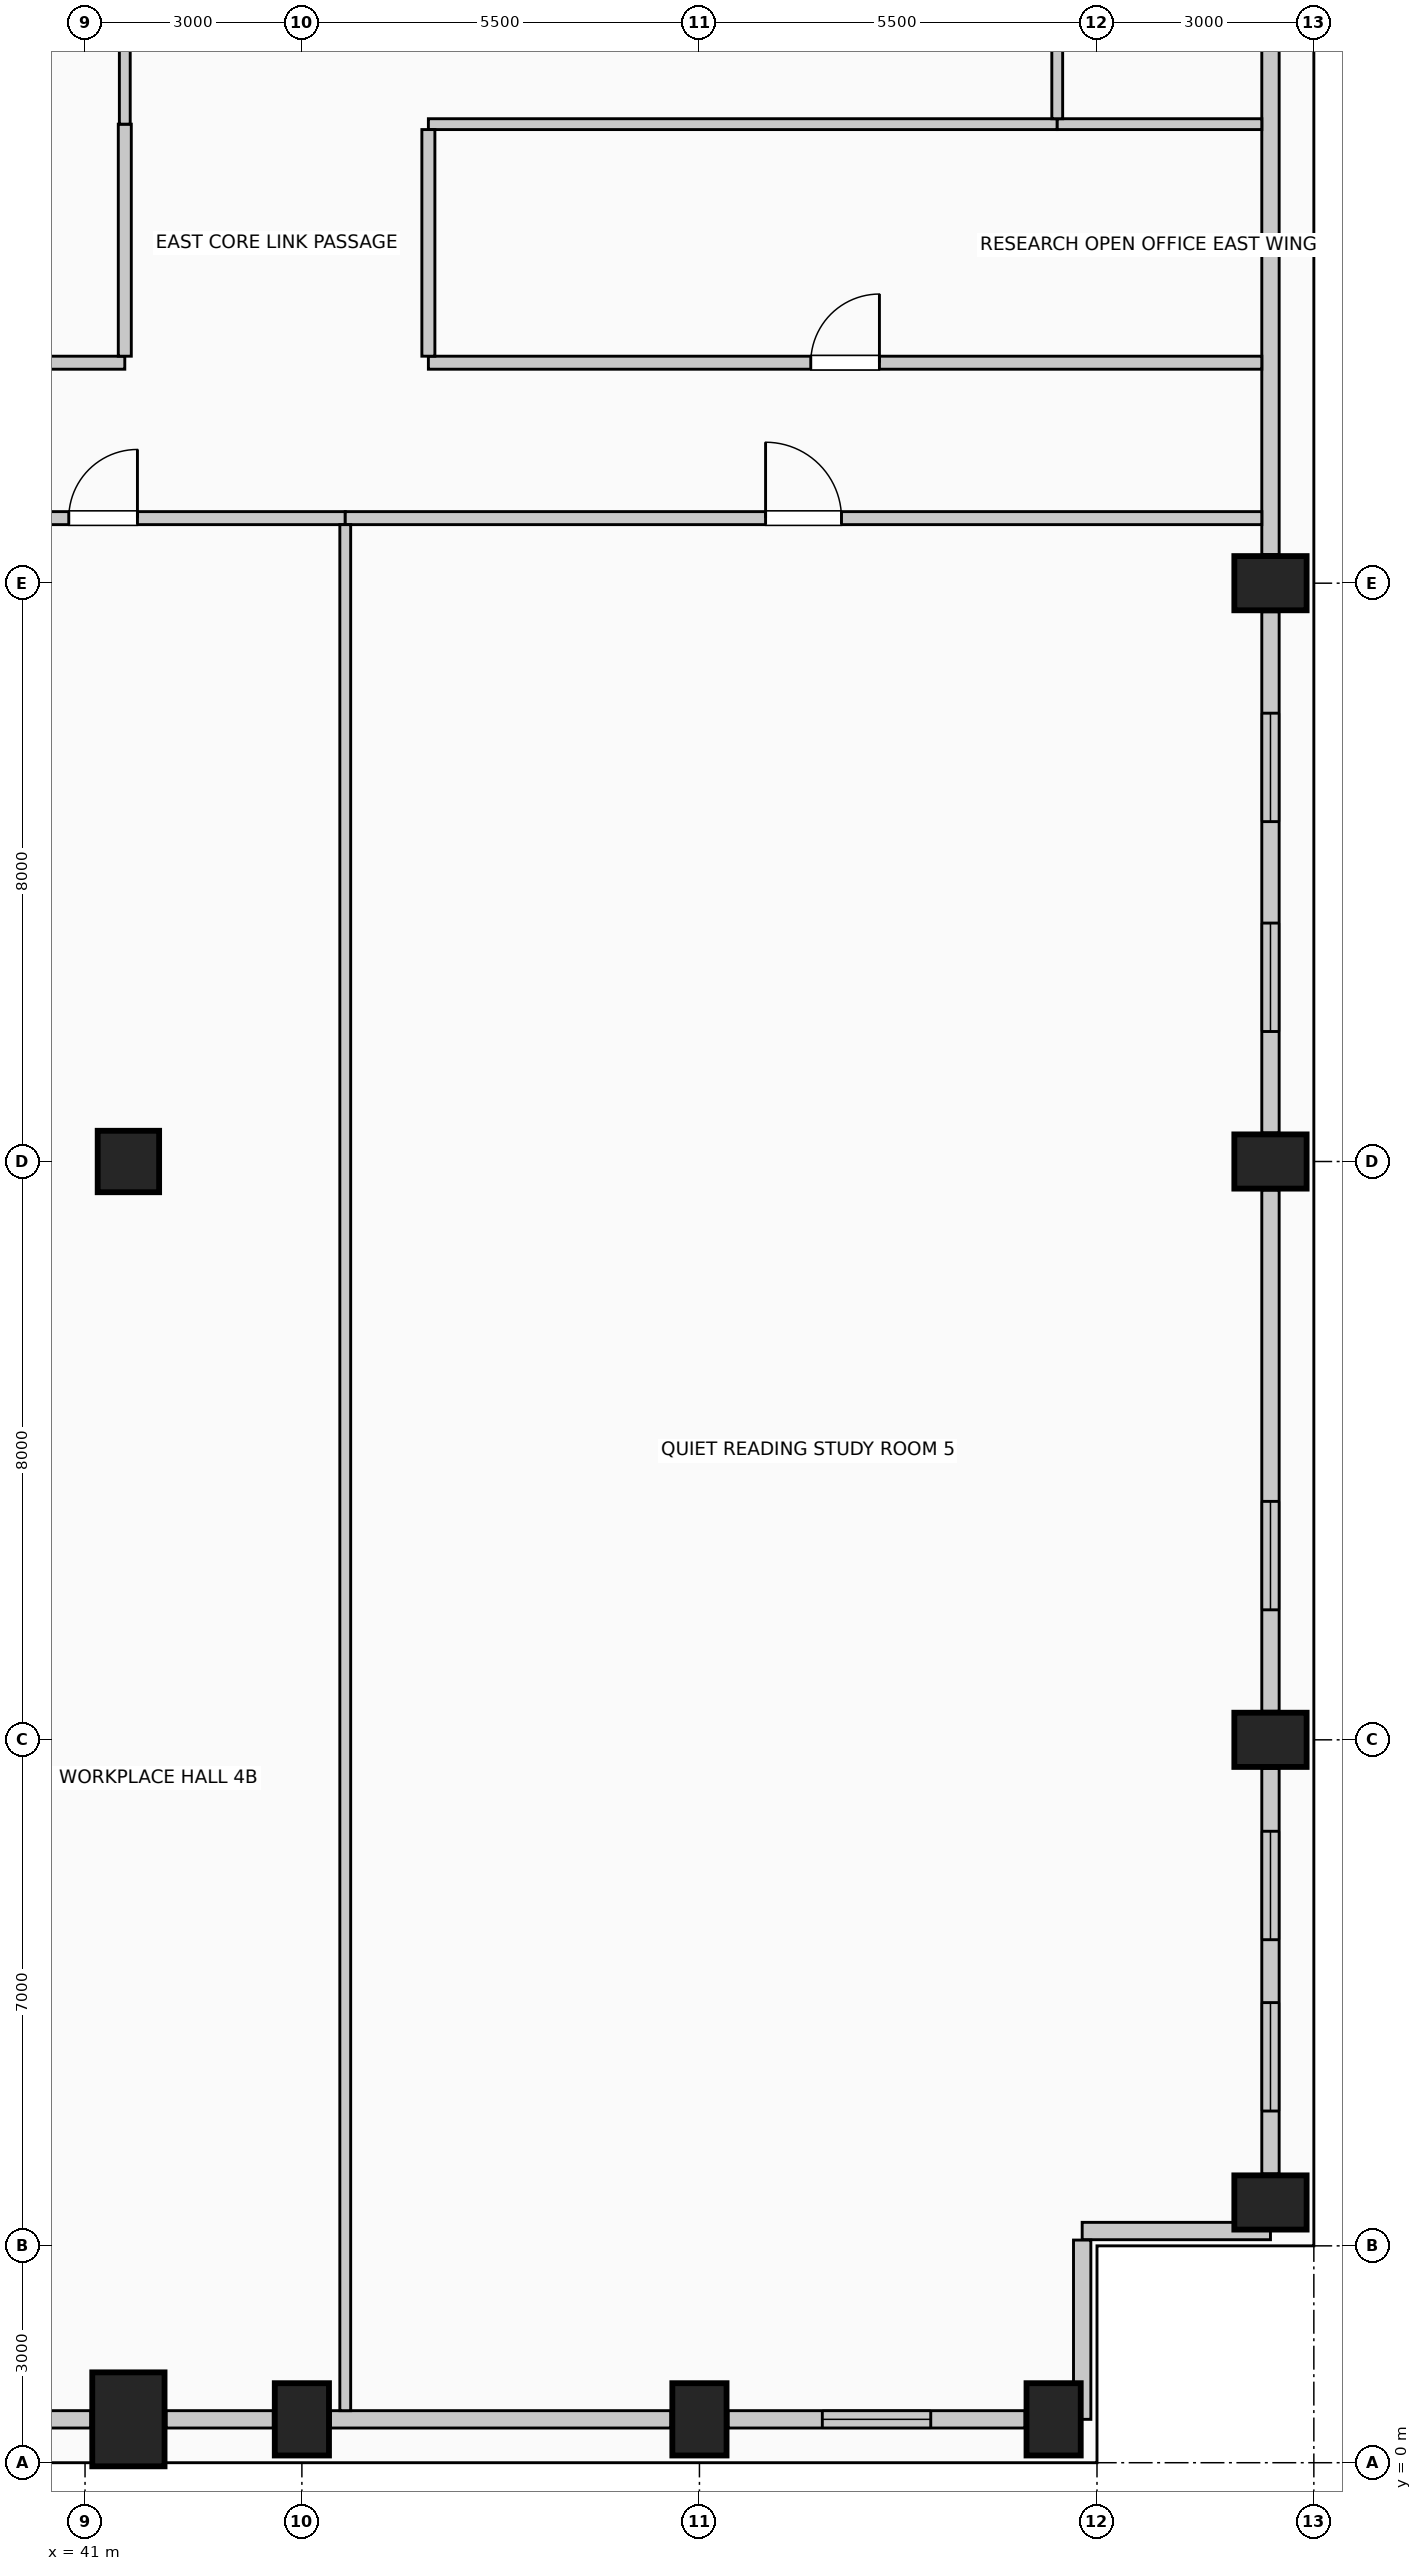
"""IFC4 building model, lengths in metres.
Left out: names, types, materials, properties, quantities, classifications, styles, units other than length and angle.
Written with IfcOpenShell. Run it as: python <this file> out.ifc"""

import sys

from ifc_helpers import new_model, si_unit, direction, frame, frame_2d, origin, origin_2d, place, context, subcontext, project, spatial, rectangle, circle, extrude, element, fill, save


model = new_model("IFC4")
c1 = context("Model", 3, precision=1e-05, world=origin(), true_north=direction((0.0, 1.0)))
c2 = subcontext(c1, "Body", "Model", "MODEL_VIEW")
j1 = project(units=[si_unit("LENGTHUNIT", "METRE"), si_unit("PLANEANGLEUNIT", "RADIAN")], contexts=[c1])
p1 = place(None, origin())
s1 = spatial("IfcSite", under=j1, at=p1, CompositionType="ELEMENT")
p2 = place(p1, origin())
s2 = spatial("IfcBuilding", under=s1, at=p2, CompositionType="ELEMENT")
p3 = place(p2, frame((0.0, 0.0, 226.6)))
s3 = spatial("IfcBuildingStorey", under=s2, at=p3, CompositionType="ELEMENT", Elevation=226.6)
p4 = place(p3, frame((41.6, 0.6, 0.0), z_axis=(0.0, 0.0, 1.0), x_axis=(1.0, 0.0, 0.0)))
e1 = element("IfcColumn", 1, at=p4, inside=s3, PredefinedType="COLUMN", context=c2, shape_type="SweptSolid", body=[
    extrude(rectangle(XDim=1.0, YDim=1.3, at=origin_2d()), origin(), (0.0, 0.0, 1.0), 4.0),
])
for number, where, z_axis, x_axis in (
    (2, (44.0, 0.6, 0.0), (0.0, 0.0, 1.0), (1.0, 0.0, 0.0)),
    (3, (49.5, 0.6, 0.0), (0.0, 0.0, 1.0), (1.0, 0.0, 0.0)),
    (4, (54.4, 0.6, 0.0), (0.0, 0.0, 1.0), (1.0, 0.0, 0.0)),
    (5, (57.4, 3.6, 0.0), (0.0, 0.0, 1.0), (0.0, 1.0, 0.0)),
    (6, (57.4, 10.0, 0.0), (0.0, 0.0, 1.0), (0.0, 1.0, 0.0)),
    (7, (57.4, 18.0, 0.0), (0.0, 0.0, 1.0), (0.0, 1.0, 0.0)),
    (8, (57.4, 26.0, 0.0), (0.0, 0.0, 1.0), (0.0, 1.0, 0.0)),
):
    element("IfcColumn", number, at=place(p3, frame(where, z_axis=z_axis, x_axis=x_axis)), inside=s3, PredefinedType="COLUMN", context=c2, shape_type="SweptSolid", body=[
        extrude(rectangle(XDim=0.75, YDim=1.0, at=origin_2d()), origin(), (0.0, 0.0, 1.0), 4.0),
    ])
p5 = place(p3, frame((41.6, 18.0, 0.0), z_axis=(0.0, 0.0, 1.0), x_axis=(1.0, 0.0, 0.0)))
e9 = element("IfcColumn", 9, at=p5, inside=s3, PredefinedType="COLUMN", context=c2, shape_type="SweptSolid", body=[
    extrude(circle(Radius=0.425, at=origin_2d()), origin(), (0.0, 0.0, 1.0), 4.0),
])
p6 = place(p3, frame((41.08, 0.6, 0.0), z_axis=(0.0, 0.0, 1.0), x_axis=(-1.0, 0.0, 0.0)))
e10 = element("IfcWall", 10, at=p6, inside=s3, PredefinedType="SOLIDWALL", context=c2, shape_type="SweptSolid", body=[
    extrude(rectangle(XDim=6.56, YDim=0.24, at=frame_2d((3.28, 0.0))), origin(), (0.0, 0.0, 1.0), 3.0),
])
p7 = place(p6, frame((1.187, 0.0, 0.42)))
e11 = element("IfcOpeningElement", 11, at=p7, cuts=e10, PredefinedType="OPENING", context=c2, shape_type="SweptSolid", body=[
    extrude(rectangle(XDim=1.5, YDim=2.2, at=frame_2d((0.75, 1.1))), frame((0.0, 0.13, 0.0), z_axis=(0.0, -1.0, 0.0), x_axis=(1.0, 0.0, 0.0)), (0.0, 0.0, 1.0), 0.26),
])
p8 = place(p3, frame((43.605, 0.6, 0.0), z_axis=(0.0, 0.0, 1.0), x_axis=(-1.0, 0.0, 0.0)))
e12 = element("IfcWall", 12, at=p8, inside=s3, PredefinedType="SOLIDWALL", context=c2, shape_type="SweptSolid", body=[
    extrude(rectangle(XDim=1.485, YDim=0.24, at=frame_2d((0.742, 0.0))), origin(), (0.0, 0.0, 1.0), 3.0),
])
p9 = place(p3, frame((49.105, 0.6, 0.0), z_axis=(0.0, 0.0, 1.0), x_axis=(-1.0, 0.0, 0.0)))
e13 = element("IfcWall", 13, at=p9, inside=s3, PredefinedType="SOLIDWALL", context=c2, shape_type="SweptSolid", body=[
    extrude(rectangle(XDim=4.71, YDim=0.24, at=frame_2d((2.355, 0.0))), origin(), (0.0, 0.0, 1.0), 3.0),
])
p10 = place(p3, frame((54.005, 0.6, 0.0), z_axis=(0.0, 0.0, 1.0), x_axis=(-1.0, 0.0, 0.0)))
e14 = element("IfcWall", 14, at=p10, inside=s3, PredefinedType="SOLIDWALL", context=c2, shape_type="SweptSolid", body=[
    extrude(rectangle(XDim=4.11, YDim=0.24, at=frame_2d((2.055, 0.0))), origin(), (0.0, 0.0, 1.0), 3.0),
])
p11 = place(p10, frame((1.305, 0.0, 0.42)))
e15 = element("IfcOpeningElement", 15, at=p11, cuts=e14, PredefinedType="OPENING", context=c2, shape_type="SweptSolid", body=[
    extrude(rectangle(XDim=1.5, YDim=2.2, at=frame_2d((0.75, 1.1))), frame((0.0, 0.13, 0.0), z_axis=(0.0, -1.0, 0.0), x_axis=(1.0, 0.0, 0.0)), (0.0, 0.0, 1.0), 0.26),
])
p12 = place(p3, frame((57.4, 9.605, 0.0), z_axis=(0.0, 0.0, 1.0), x_axis=(0.0, -1.0, 0.0)))
e16 = element("IfcWall", 16, at=p12, inside=s3, PredefinedType="SOLIDWALL", context=c2, shape_type="SweptSolid", body=[
    extrude(rectangle(XDim=5.61, YDim=0.24, at=frame_2d((2.805, 0.0))), origin(), (0.0, 0.0, 1.0), 3.0),
])
p13 = place(p12, frame((0.87, 0.0, 0.42)))
e17 = element("IfcOpeningElement", 17, at=p13, cuts=e16, PredefinedType="OPENING", context=c2, shape_type="SweptSolid", body=[
    extrude(rectangle(XDim=1.5, YDim=2.2, at=frame_2d((0.75, 1.1))), frame((0.0, 0.13, 0.0), z_axis=(0.0, -1.0, 0.0), x_axis=(1.0, 0.0, 0.0)), (0.0, 0.0, 1.0), 0.26),
])
p14 = place(p12, frame((3.24, 0.0, 0.42)))
e18 = element("IfcOpeningElement", 18, at=p14, cuts=e16, PredefinedType="OPENING", context=c2, shape_type="SweptSolid", body=[
    extrude(rectangle(XDim=1.5, YDim=2.2, at=frame_2d((0.75, 1.1))), frame((0.0, 0.13, 0.0), z_axis=(0.0, -1.0, 0.0), x_axis=(1.0, 0.0, 0.0)), (0.0, 0.0, 1.0), 0.26),
])
p15 = place(p3, frame((57.4, 17.605, 0.0), z_axis=(0.0, 0.0, 1.0), x_axis=(0.0, -1.0, 0.0)))
e19 = element("IfcWall", 19, at=p15, inside=s3, PredefinedType="SOLIDWALL", context=c2, shape_type="SweptSolid", body=[
    extrude(rectangle(XDim=7.21, YDim=0.24, at=frame_2d((3.605, 0.0))), origin(), (0.0, 0.0, 1.0), 3.0),
])
p16 = place(p15, frame((4.307, 0.0, 0.42)))
e20 = element("IfcOpeningElement", 20, at=p16, cuts=e19, PredefinedType="OPENING", context=c2, shape_type="SweptSolid", body=[
    extrude(rectangle(XDim=1.5, YDim=2.2, at=frame_2d((0.75, 1.1))), frame((0.0, 0.13, 0.0), z_axis=(0.0, -1.0, 0.0), x_axis=(1.0, 0.0, 0.0)), (0.0, 0.0, 1.0), 0.26),
])
p17 = place(p3, frame((57.4, 25.605, 0.0), z_axis=(0.0, 0.0, 1.0), x_axis=(0.0, -1.0, 0.0)))
e21 = element("IfcWall", 21, at=p17, inside=s3, PredefinedType="SOLIDWALL", context=c2, shape_type="SweptSolid", body=[
    extrude(rectangle(XDim=7.21, YDim=0.24, at=frame_2d((3.605, 0.0))), origin(), (0.0, 0.0, 1.0), 3.0),
])
p18 = place(p17, frame((1.403, 0.0, 0.42)))
e22 = element("IfcOpeningElement", 22, at=p18, cuts=e21, PredefinedType="OPENING", context=c2, shape_type="SweptSolid", body=[
    extrude(rectangle(XDim=1.5, YDim=2.2, at=frame_2d((0.75, 1.1))), frame((0.0, 0.13, 0.0), z_axis=(0.0, -1.0, 0.0), x_axis=(1.0, 0.0, 0.0)), (0.0, 0.0, 1.0), 0.26),
])
p19 = place(p17, frame((4.307, 0.0, 0.42)))
e23 = element("IfcOpeningElement", 23, at=p19, cuts=e21, PredefinedType="OPENING", context=c2, shape_type="SweptSolid", body=[
    extrude(rectangle(XDim=1.5, YDim=2.2, at=frame_2d((0.75, 1.1))), frame((0.0, 0.13, 0.0), z_axis=(0.0, -1.0, 0.0), x_axis=(1.0, 0.0, 0.0)), (0.0, 0.0, 1.0), 0.26),
])
p20 = place(p3, frame((57.4, 33.605, 0.0), z_axis=(0.0, 0.0, 1.0), x_axis=(0.0, -1.0, 0.0)))
e24 = element("IfcWall", 24, at=p20, inside=s3, PredefinedType="SOLIDWALL", context=c2, shape_type="SweptSolid", body=[
    extrude(rectangle(XDim=7.21, YDim=0.24, at=frame_2d((3.605, 0.0))), origin(), (0.0, 0.0, 1.0), 3.0),
])
p21 = place(p3, frame((57.4, 3.205, 0.0), z_axis=(0.0, 0.0, 1.0), x_axis=(-1.0, 0.0, 0.0)))
e25 = element("IfcWall", 25, at=p21, inside=s3, PredefinedType="SOLIDWALL", context=c2, shape_type="SweptSolid", body=[
    extrude(rectangle(XDim=2.605, YDim=0.24, at=frame_2d((1.302, 0.0))), origin(), (0.0, 0.0, 1.0), 3.75),
])
p22 = place(p3, frame((54.795, 3.08, 0.0), z_axis=(0.0, 0.0, 1.0), x_axis=(0.0, -1.0, 0.0)))
e26 = element("IfcWall", 26, at=p22, inside=s3, PredefinedType="SOLIDWALL", context=c2, shape_type="SweptSolid", body=[
    extrude(rectangle(XDim=2.48, YDim=0.24, at=frame_2d((1.24, 0.0))), origin(), (0.0, 0.0, 1.0), 3.75),
])
p23 = place(p3, frame((37.9, 26.9, 0.0), z_axis=(0.0, 0.0, 1.0), x_axis=(1.0, 0.0, 0.0)))
e27 = element("IfcWall", 27, at=p23, inside=s3, PredefinedType="PARTITIONING", context=c2, shape_type="SweptSolid", body=[
    extrude(rectangle(XDim=6.7, YDim=0.18, at=frame_2d((3.35, 0.0))), origin(), (0.0, 0.0, 1.0), 3.75),
])
p24 = place(p23, frame((2.875, 0.0, 0.0)))
e28 = element("IfcOpeningElement", 28, at=p24, cuts=e27, PredefinedType="OPENING", context=c2, shape_type="SweptSolid", body=[
    extrude(rectangle(XDim=0.95, YDim=2.15, at=frame_2d((0.475, 1.075))), frame((0.0, 0.1, 0.0), z_axis=(0.0, -1.0, 0.0), x_axis=(1.0, 0.0, 0.0)), (0.0, 0.0, 1.0), 0.2),
])
p25 = place(p3, frame((44.6, 26.9, 0.0), z_axis=(0.0, 0.0, 1.0), x_axis=(1.0, 0.0, 0.0)))
e29 = element("IfcWall", 29, at=p25, inside=s3, PredefinedType="PARTITIONING", context=c2, shape_type="SweptSolid", body=[
    extrude(rectangle(XDim=12.68, YDim=0.18, at=frame_2d((6.34, 0.0))), origin(), (0.0, 0.0, 1.0), 3.75),
])
p26 = place(p25, frame((5.815, 0.0, 0.0)))
e30 = element("IfcOpeningElement", 30, at=p26, cuts=e29, PredefinedType="OPENING", context=c2, shape_type="SweptSolid", body=[
    extrude(rectangle(XDim=1.05, YDim=2.15, at=frame_2d((0.525, 1.075))), frame((0.0, 0.1, 0.0), z_axis=(0.0, -1.0, 0.0), x_axis=(1.0, 0.0, 0.0)), (0.0, 0.0, 1.0), 0.2),
])
p27 = place(p3, frame((35.99, 29.05, 0.0), z_axis=(0.0, 0.0, 1.0), x_axis=(1.0, 0.0, 0.0)))
e31 = element("IfcWall", 31, at=p27, inside=s3, PredefinedType="PARTITIONING", context=c2, shape_type="SweptSolid", body=[
    extrude(rectangle(XDim=5.56, YDim=0.18, at=frame_2d((2.78, 0.0))), origin(), (0.0, 0.0, 1.0), 3.75),
])
p28 = place(p27, frame((2.255, 0.0, 0.0)))
e32 = element("IfcOpeningElement", 32, at=p28, cuts=e31, PredefinedType="OPENING", context=c2, shape_type="SweptSolid", body=[
    extrude(rectangle(XDim=1.05, YDim=2.15, at=frame_2d((0.525, 1.075))), frame((0.0, 0.1, 0.0), z_axis=(0.0, -1.0, 0.0), x_axis=(1.0, 0.0, 0.0)), (0.0, 0.0, 1.0), 0.2),
])
p29 = place(p3, frame((45.75, 29.05, 0.0), z_axis=(0.0, 0.0, 1.0), x_axis=(1.0, 0.0, 0.0)))
e33 = element("IfcWall", 33, at=p29, inside=s3, PredefinedType="PARTITIONING", context=c2, shape_type="SweptSolid", body=[
    extrude(rectangle(XDim=11.53, YDim=0.18, at=frame_2d((5.765, 0.0))), origin(), (0.0, 0.0, 1.0), 3.75),
])
p30 = place(p29, frame((5.29, 0.0, 0.0)))
e34 = element("IfcOpeningElement", 34, at=p30, cuts=e33, PredefinedType="OPENING", context=c2, shape_type="SweptSolid", body=[
    extrude(rectangle(XDim=0.95, YDim=2.15, at=frame_2d((0.475, 1.075))), frame((0.0, 0.1, 0.0), z_axis=(0.0, -1.0, 0.0), x_axis=(1.0, 0.0, 0.0)), (0.0, 0.0, 1.0), 0.2),
])
p31 = place(p3, frame((45.75, 32.35, 0.0), z_axis=(0.0, 0.0, 1.0), x_axis=(1.0, 0.0, 0.0)))
e35 = element("IfcWall", 35, at=p31, inside=s3, PredefinedType="PARTITIONING", context=c2, shape_type="SweptSolid", body=[
    extrude(rectangle(XDim=8.7, YDim=0.15, at=frame_2d((4.35, 0.0))), origin(), (0.0, 0.0, 1.0), 3.75),
])
p32 = place(p3, frame((54.45, 32.35, 0.0), z_axis=(0.0, 0.0, 1.0), x_axis=(1.0, 0.0, 0.0)))
e36 = element("IfcWall", 36, at=p32, inside=s3, PredefinedType="PARTITIONING", context=c2, shape_type="SweptSolid", body=[
    extrude(rectangle(XDim=2.83, YDim=0.15, at=frame_2d((1.415, 0.0))), origin(), (0.0, 0.0, 1.0), 3.75),
])
p33 = place(p3, frame((41.55, 29.14, 0.0), z_axis=(0.0, 0.0, 1.0), x_axis=(0.0, 1.0, 0.0)))
e37 = element("IfcWall", 37, at=p33, inside=s3, PredefinedType="PARTITIONING", context=c2, shape_type="SweptSolid", body=[
    extrude(rectangle(XDim=3.21, YDim=0.18, at=frame_2d((1.605, 0.0))), origin(), (0.0, 0.0, 1.0), 3.145),
])
p34 = place(p3, frame((41.55, 32.35, 0.0), z_axis=(0.0, 0.0, 1.0), x_axis=(0.0, 1.0, 0.0)))
e38 = element("IfcWall", 38, at=p34, inside=s3, PredefinedType="PARTITIONING", context=c2, shape_type="SweptSolid", body=[
    extrude(rectangle(XDim=1.225, YDim=0.15, at=frame_2d((0.612, 0.0))), origin(), (0.0, 0.0, 1.0), 3.145),
])
p35 = place(p3, frame((44.6, 0.72, 0.0), z_axis=(0.0, 0.0, 1.0), x_axis=(0.0, 1.0, 0.0)))
e39 = element("IfcWall", 39, at=p35, inside=s3, PredefinedType="PARTITIONING", context=c2, shape_type="SweptSolid", body=[
    extrude(rectangle(XDim=26.09, YDim=0.15, at=frame_2d((13.045, 0.0))), origin(), (0.0, 0.0, 1.0), 3.75),
])
p36 = place(p3, frame((45.75, 29.14, 0.0), z_axis=(0.0, 0.0, 1.0), x_axis=(0.0, 1.0, 0.0)))
e40 = element("IfcWall", 40, at=p36, inside=s3, PredefinedType="PARTITIONING", context=c2, shape_type="SweptSolid", body=[
    extrude(rectangle(XDim=3.135, YDim=0.18, at=frame_2d((1.567, 0.0))), origin(), (0.0, 0.0, 1.0), 3.75),
])
p37 = place(p3, frame((54.45, 32.425, 0.0), z_axis=(0.0, 0.0, 1.0), x_axis=(0.0, 1.0, 0.0)))
e41 = element("IfcWall", 41, at=p37, inside=s3, PredefinedType="PARTITIONING", context=c2, shape_type="SweptSolid", body=[
    extrude(rectangle(XDim=1.725, YDim=0.15, at=frame_2d((0.862, 0.0))), origin(), (0.0, 0.0, 1.0), 3.75),
])
p38 = place(p11, origin())
e42 = element("IfcWindow", 42, at=p38, inside=s3, PartitioningType="SINGLE_PANEL", PredefinedType="WINDOW", context=c2, shape_type="SweptSolid", body=[
    extrude(rectangle(XDim=1.5, YDim=2.2, at=frame_2d((0.75, 1.1))), frame((0.0, 0.03, 0.0), z_axis=(0.0, -1.0, 0.0), x_axis=(1.0, 0.0, 0.0)), (0.0, 0.0, 1.0), 0.06),
])
fill(e15, e42)
p39 = place(p13, origin())
e43 = element("IfcWindow", 43, at=p39, inside=s3, PartitioningType="SINGLE_PANEL", PredefinedType="WINDOW", context=c2, shape_type="SweptSolid", body=[
    extrude(rectangle(XDim=1.5, YDim=2.2, at=frame_2d((0.75, 1.1))), frame((0.0, 0.03, 0.0), z_axis=(0.0, -1.0, 0.0), x_axis=(1.0, 0.0, 0.0)), (0.0, 0.0, 1.0), 0.06),
])
fill(e17, e43)
p40 = place(p14, origin())
e44 = element("IfcWindow", 44, at=p40, inside=s3, PartitioningType="SINGLE_PANEL", PredefinedType="WINDOW", context=c2, shape_type="SweptSolid", body=[
    extrude(rectangle(XDim=1.5, YDim=2.2, at=frame_2d((0.75, 1.1))), frame((0.0, 0.03, 0.0), z_axis=(0.0, -1.0, 0.0), x_axis=(1.0, 0.0, 0.0)), (0.0, 0.0, 1.0), 0.06),
])
fill(e18, e44)
p41 = place(p16, origin())
e45 = element("IfcWindow", 45, at=p41, inside=s3, PartitioningType="SINGLE_PANEL", PredefinedType="WINDOW", context=c2, shape_type="SweptSolid", body=[
    extrude(rectangle(XDim=1.5, YDim=2.2, at=frame_2d((0.75, 1.1))), frame((0.0, 0.03, 0.0), z_axis=(0.0, -1.0, 0.0), x_axis=(1.0, 0.0, 0.0)), (0.0, 0.0, 1.0), 0.06),
])
fill(e20, e45)
p42 = place(p18, origin())
e46 = element("IfcWindow", 46, at=p42, inside=s3, PartitioningType="SINGLE_PANEL", PredefinedType="WINDOW", context=c2, shape_type="SweptSolid", body=[
    extrude(rectangle(XDim=1.5, YDim=2.2, at=frame_2d((0.75, 1.1))), frame((0.0, 0.03, 0.0), z_axis=(0.0, -1.0, 0.0), x_axis=(1.0, 0.0, 0.0)), (0.0, 0.0, 1.0), 0.06),
])
fill(e22, e46)
p43 = place(p19, origin())
e47 = element("IfcWindow", 47, at=p43, inside=s3, PartitioningType="SINGLE_PANEL", PredefinedType="WINDOW", context=c2, shape_type="SweptSolid", body=[
    extrude(rectangle(XDim=1.5, YDim=2.2, at=frame_2d((0.75, 1.1))), frame((0.0, 0.03, 0.0), z_axis=(0.0, -1.0, 0.0), x_axis=(1.0, 0.0, 0.0)), (0.0, 0.0, 1.0), 0.06),
])
fill(e23, e47)
p44 = place(p24, origin())
e48 = element("IfcDoor", 48, at=p44, inside=s3, OperationType="SINGLE_SWING_RIGHT", PredefinedType="DOOR", context=c2, shape_type="SweptSolid", body=[
    extrude(rectangle(XDim=0.95, YDim=2.15, at=frame_2d((0.475, 1.075))), frame((0.0, 0.025, 0.0), z_axis=(0.0, -1.0, 0.0), x_axis=(1.0, 0.0, 0.0)), (0.0, 0.0, 1.0), 0.05),
])
fill(e28, e48)
p45 = place(p26, origin())
e49 = element("IfcDoor", 49, at=p45, inside=s3, OperationType="SINGLE_SWING_LEFT", PredefinedType="DOOR", context=c2, shape_type="SweptSolid", body=[
    extrude(rectangle(XDim=1.05, YDim=2.15, at=frame_2d((0.525, 1.075))), frame((0.0, 0.025, 0.0), z_axis=(0.0, -1.0, 0.0), x_axis=(1.0, 0.0, 0.0)), (0.0, 0.0, 1.0), 0.05),
])
fill(e30, e49)
p46 = place(p30, origin())
e50 = element("IfcDoor", 50, at=p46, inside=s3, OperationType="SINGLE_SWING_RIGHT", PredefinedType="DOOR", context=c2, shape_type="SweptSolid", body=[
    extrude(rectangle(XDim=0.95, YDim=2.15, at=frame_2d((0.475, 1.075))), frame((0.0, 0.025, 0.0), z_axis=(0.0, -1.0, 0.0), x_axis=(1.0, 0.0, 0.0)), (0.0, 0.0, 1.0), 0.05),
])
fill(e34, e50)
save(model, sys.argv[1])
